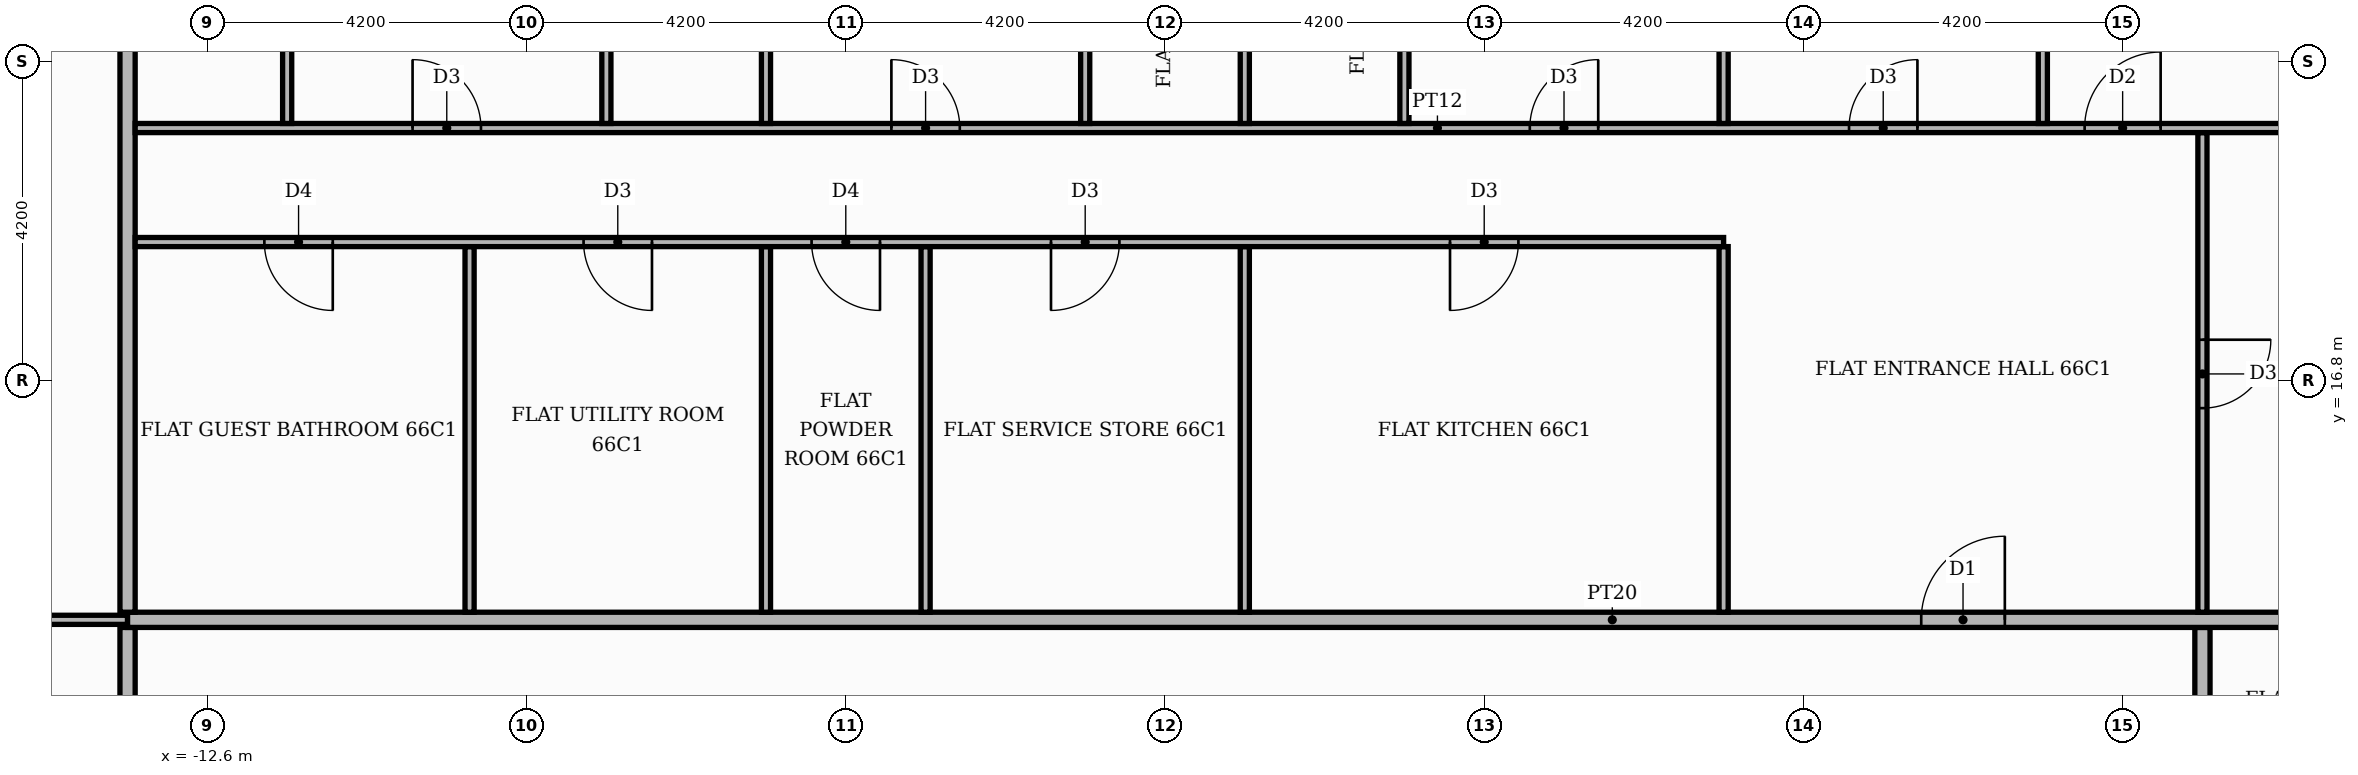
"""IFC4 building model, lengths in metres.
Left out: names, types, materials, properties, quantities, classifications, styles, units other than length and angle.
Written with IfcOpenShell. Run it as: python <this file> out.ifc"""

import sys

from ifc_helpers import new_model, si_unit, direction, frame, frame_2d, origin, place, context, subcontext, project, spatial, rectangle, extrude, element, fill, save


model = new_model("IFC4")
c1 = context("Model", 3, precision=1e-05, world=origin(), true_north=direction((0.0, 1.0)))
c2 = subcontext(c1, "Body", "Model", "MODEL_VIEW")
j1 = project(units=[si_unit("LENGTHUNIT", "METRE"), si_unit("PLANEANGLEUNIT", "RADIAN")], contexts=[c1])
p1 = place(None, origin())
s1 = spatial("IfcSite", under=j1, at=p1, CompositionType="ELEMENT")
p2 = place(p1, origin())
s2 = spatial("IfcBuilding", under=s1, at=p2, CompositionType="ELEMENT")
p3 = place(p2, frame((0.0, 0.0, 275.7)))
s3 = spatial("IfcBuildingStorey", under=s2, at=p3, CompositionType="ELEMENT", Elevation=275.7)
for number, where, z_axis, x_axis in (
    (1, (-13.65, 11.1, 0.0), (0.0, 0.0, 1.0), (0.0, 1.0, 0.0)),
    (2, (13.65, 11.1, 0.0), (0.0, 0.0, 1.0), (0.0, 1.0, 0.0)),
):
    element("IfcWall", number, at=place(p3, frame(where, z_axis=z_axis, x_axis=x_axis)), inside=s3, PredefinedType="PARTITIONING", context=c2, shape_type="SweptSolid", body=[
        extrude(rectangle(XDim=2.45, YDim=0.2, at=frame_2d((1.225, 0.0))), origin(), (0.0, 0.0, 1.0), 3.48),
    ])
p4 = place(p3, frame((-20.72, 13.65, 0.0), z_axis=(0.0, 0.0, 1.0), x_axis=(1.0, 0.0, 0.0)))
e3 = element("IfcWall", 3, at=p4, inside=s3, PredefinedType="PARTITIONING", context=c2, shape_type="SweptSolid", body=[
    extrude(rectangle(XDim=7.07, YDim=0.12, at=frame_2d((3.535, 0.0))), origin(), (0.0, 0.0, 1.0), 3.48),
])
p5 = place(p4, frame((3.085, 0.0, 0.0)))
e4 = element("IfcOpeningElement", 4, at=p5, cuts=e3, PredefinedType="OPENING", context=c2, shape_type="SweptSolid", body=[
    extrude(rectangle(XDim=0.9, YDim=2.1, at=frame_2d((0.45, 1.05))), frame((0.0, 0.07, 0.0), z_axis=(0.0, -1.0, 0.0), x_axis=(1.0, 0.0, 0.0)), (0.0, 0.0, 1.0), 0.14),
])
p6 = place(p3, frame((-13.65, 13.65, 0.0), z_axis=(0.0, 0.0, 1.0), x_axis=(1.0, 0.0, 0.0)))
e5 = element("IfcWall", 5, at=p6, inside=s3, PredefinedType="PARTITIONING", context=c2, shape_type="SweptSolid", body=[
    extrude(rectangle(XDim=39.07, YDim=0.2, at=frame_2d((19.535, 0.0))), origin(), (0.0, 0.0, 1.0), 3.48),
])
p7 = place(p6, frame((23.6, 0.0, 0.0)))
e6 = element("IfcOpeningElement", 6, at=p7, cuts=e5, PredefinedType="OPENING", context=c2, shape_type="SweptSolid", body=[
    extrude(rectangle(XDim=1.1, YDim=2.4, at=frame_2d((0.55, 1.2))), frame((0.0, 0.11, 0.0), z_axis=(0.0, -1.0, 0.0), x_axis=(1.0, 0.0, 0.0)), (0.0, 0.0, 1.0), 0.22),
])
p8 = place(p3, frame((-13.65, 13.75, 0.0), z_axis=(0.0, 0.0, 1.0), x_axis=(0.0, 1.0, 0.0)))
e7 = element("IfcWall", 7, at=p8, inside=s3, PredefinedType="PARTITIONING", context=c2, shape_type="SweptSolid", body=[
    extrude(rectangle(XDim=11.67, YDim=0.2, at=frame_2d((5.835, 0.0))), origin(), (0.0, 0.0, 1.0), 3.48),
])
for number, where, z_axis, x_axis in (
    (8, (-9.15, 13.75, 0.0), (0.0, 0.0, 1.0), (0.0, 1.0, 0.0)),
    (9, (-5.25, 13.75, 0.0), (0.0, 0.0, 1.0), (0.0, 1.0, 0.0)),
    (10, (-3.15, 13.75, 0.0), (0.0, 0.0, 1.0), (0.0, 1.0, 0.0)),
    (11, (1.05, 13.75, 0.0), (0.0, 0.0, 1.0), (0.0, 1.0, 0.0)),
    (12, (7.35, 13.75, 0.0), (0.0, 0.0, 1.0), (0.0, 1.0, 0.0)),
):
    element("IfcWall", number, at=place(p3, frame(where, z_axis=z_axis, x_axis=x_axis)), inside=s3, PredefinedType="PARTITIONING", context=c2, shape_type="SweptSolid", body=[
        extrude(rectangle(XDim=4.81, YDim=0.12, at=frame_2d((2.405, 0.0))), origin(), (0.0, 0.0, 1.0), 3.48),
    ])
p9 = place(p3, frame((13.65, 13.75, 0.0), z_axis=(0.0, 0.0, 1.0), x_axis=(0.0, 1.0, 0.0)))
e13 = element("IfcWall", 13, at=p9, inside=s3, PredefinedType="PARTITIONING", context=c2, shape_type="SweptSolid", body=[
    extrude(rectangle(XDim=6.31, YDim=0.12, at=frame_2d((3.155, 0.0))), origin(), (0.0, 0.0, 1.0), 3.48),
])
p10 = place(p9, frame((2.685, 0.0, 0.0)))
e14 = element("IfcOpeningElement", 14, at=p10, cuts=e13, PredefinedType="OPENING", context=c2, shape_type="SweptSolid", body=[
    extrude(rectangle(XDim=0.9, YDim=2.1, at=frame_2d((0.45, 1.05))), frame((0.0, 0.07, 0.0), z_axis=(0.0, -1.0, 0.0), x_axis=(1.0, 0.0, 0.0)), (0.0, 0.0, 1.0), 0.14),
])
p11 = place(p3, frame((-13.55, 18.62, 0.0), z_axis=(0.0, 0.0, 1.0), x_axis=(1.0, 0.0, 0.0)))
e15 = element("IfcWall", 15, at=p11, inside=s3, PredefinedType="PARTITIONING", context=c2, shape_type="SweptSolid", body=[
    extrude(rectangle(XDim=20.9, YDim=0.12, at=frame_2d((10.45, 0.0))), origin(), (0.0, 0.0, 1.0), 3.48),
])
p12 = place(p11, frame((17.3, 0.0, 0.0)))
e16 = element("IfcOpeningElement", 16, at=p12, cuts=e15, PredefinedType="OPENING", context=c2, shape_type="SweptSolid", body=[
    extrude(rectangle(XDim=0.9, YDim=2.1, at=frame_2d((0.45, 1.05))), frame((0.0, 0.07, 0.0), z_axis=(0.0, -1.0, 0.0), x_axis=(1.0, 0.0, 0.0)), (0.0, 0.0, 1.0), 0.14),
])
p13 = place(p11, frame((12.05, 0.0, 0.0)))
e17 = element("IfcOpeningElement", 17, at=p13, cuts=e15, PredefinedType="OPENING", context=c2, shape_type="SweptSolid", body=[
    extrude(rectangle(XDim=0.9, YDim=2.1, at=frame_2d((0.45, 1.05))), frame((0.0, 0.07, 0.0), z_axis=(0.0, -1.0, 0.0), x_axis=(1.0, 0.0, 0.0)), (0.0, 0.0, 1.0), 0.14),
])
p14 = place(p11, frame((8.9, 0.0, 0.0)))
e18 = element("IfcOpeningElement", 18, at=p14, cuts=e15, PredefinedType="OPENING", context=c2, shape_type="SweptSolid", body=[
    extrude(rectangle(XDim=0.9, YDim=2.1, at=frame_2d((0.45, 1.05))), frame((0.0, 0.07, 0.0), z_axis=(0.0, -1.0, 0.0), x_axis=(1.0, 0.0, 0.0)), (0.0, 0.0, 1.0), 0.14),
])
p15 = place(p11, frame((5.9, 0.0, 0.0)))
e19 = element("IfcOpeningElement", 19, at=p15, cuts=e15, PredefinedType="OPENING", context=c2, shape_type="SweptSolid", body=[
    extrude(rectangle(XDim=0.9, YDim=2.1, at=frame_2d((0.45, 1.05))), frame((0.0, 0.07, 0.0), z_axis=(0.0, -1.0, 0.0), x_axis=(1.0, 0.0, 0.0)), (0.0, 0.0, 1.0), 0.14),
])
p16 = place(p11, frame((1.7, 0.0, 0.0)))
e20 = element("IfcOpeningElement", 20, at=p16, cuts=e15, PredefinedType="OPENING", context=c2, shape_type="SweptSolid", body=[
    extrude(rectangle(XDim=0.9, YDim=2.1, at=frame_2d((0.45, 1.05))), frame((0.0, 0.07, 0.0), z_axis=(0.0, -1.0, 0.0), x_axis=(1.0, 0.0, 0.0)), (0.0, 0.0, 1.0), 0.14),
])
p17 = place(p3, frame((-13.55, 20.12, 0.0), z_axis=(0.0, 0.0, 1.0), x_axis=(1.0, 0.0, 0.0)))
e21 = element("IfcWall", 21, at=p17, inside=s3, PredefinedType="PARTITIONING", context=c2, shape_type="SweptSolid", body=[
    extrude(rectangle(XDim=34.269, YDim=0.12, at=frame_2d((17.135, 0.0))), origin(), (0.0, 0.0, 1.0), 3.48),
])
p18 = place(p17, frame((25.65, 0.0, 0.0)))
e22 = element("IfcOpeningElement", 22, at=p18, cuts=e21, PredefinedType="OPENING", context=c2, shape_type="SweptSolid", body=[
    extrude(rectangle(XDim=1.0, YDim=2.1, at=frame_2d((0.5, 1.05))), frame((0.0, 0.07, 0.0), z_axis=(0.0, -1.0, 0.0), x_axis=(1.0, 0.0, 0.0)), (0.0, 0.0, 1.0), 0.14),
])
p19 = place(p17, frame((22.55, 0.0, 0.0)))
e23 = element("IfcOpeningElement", 23, at=p19, cuts=e21, PredefinedType="OPENING", context=c2, shape_type="SweptSolid", body=[
    extrude(rectangle(XDim=0.9, YDim=2.1, at=frame_2d((0.45, 1.05))), frame((0.0, 0.07, 0.0), z_axis=(0.0, -1.0, 0.0), x_axis=(1.0, 0.0, 0.0)), (0.0, 0.0, 1.0), 0.14),
])
p20 = place(p17, frame((18.35, 0.0, 0.0)))
e24 = element("IfcOpeningElement", 24, at=p20, cuts=e21, PredefinedType="OPENING", context=c2, shape_type="SweptSolid", body=[
    extrude(rectangle(XDim=0.9, YDim=2.1, at=frame_2d((0.45, 1.05))), frame((0.0, 0.07, 0.0), z_axis=(0.0, -1.0, 0.0), x_axis=(1.0, 0.0, 0.0)), (0.0, 0.0, 1.0), 0.14),
])
p21 = place(p17, frame((9.95, 0.0, 0.0)))
e25 = element("IfcOpeningElement", 25, at=p21, cuts=e21, PredefinedType="OPENING", context=c2, shape_type="SweptSolid", body=[
    extrude(rectangle(XDim=0.9, YDim=2.1, at=frame_2d((0.45, 1.05))), frame((0.0, 0.07, 0.0), z_axis=(0.0, -1.0, 0.0), x_axis=(1.0, 0.0, 0.0)), (0.0, 0.0, 1.0), 0.14),
])
p22 = place(p17, frame((3.65, 0.0, 0.0)))
e26 = element("IfcOpeningElement", 26, at=p22, cuts=e21, PredefinedType="OPENING", context=c2, shape_type="SweptSolid", body=[
    extrude(rectangle(XDim=0.9, YDim=2.1, at=frame_2d((0.45, 1.05))), frame((0.0, 0.07, 0.0), z_axis=(0.0, -1.0, 0.0), x_axis=(1.0, 0.0, 0.0)), (0.0, 0.0, 1.0), 0.14),
])
p23 = place(p3, frame((-11.55, 20.18, 0.0), z_axis=(0.0, 0.0, 1.0), x_axis=(0.0, 1.0, 0.0)))
e27 = element("IfcWall", 27, at=p23, inside=s3, PredefinedType="PARTITIONING", context=c2, shape_type="SweptSolid", body=[
    extrude(rectangle(XDim=5.24, YDim=0.12, at=frame_2d((2.62, 0.0))), origin(), (0.0, 0.0, 1.0), 3.48),
])
p24 = place(p23, frame((2.29, 0.0, 0.0)))
e28 = element("IfcOpeningElement", 28, at=p24, cuts=e27, PredefinedType="OPENING", context=c2, shape_type="SweptSolid", body=[
    extrude(rectangle(XDim=0.9, YDim=2.1, at=frame_2d((0.45, 1.05))), frame((0.0, 0.07, 0.0), z_axis=(0.0, -1.0, 0.0), x_axis=(1.0, 0.0, 0.0)), (0.0, 0.0, 1.0), 0.14),
])
p25 = place(p3, frame((-7.35, 20.18, 0.0), z_axis=(0.0, 0.0, 1.0), x_axis=(0.0, 1.0, 0.0)))
e29 = element("IfcWall", 29, at=p25, inside=s3, PredefinedType="PARTITIONING", context=c2, shape_type="SweptSolid", body=[
    extrude(rectangle(XDim=5.24, YDim=0.12, at=frame_2d((2.62, 0.0))), origin(), (0.0, 0.0, 1.0), 3.48),
])
p26 = place(p3, frame((-5.25, 20.18, 0.0), z_axis=(0.0, 0.0, 1.0), x_axis=(0.0, 1.0, 0.0)))
e30 = element("IfcWall", 30, at=p26, inside=s3, PredefinedType="PARTITIONING", context=c2, shape_type="SweptSolid", body=[
    extrude(rectangle(XDim=5.24, YDim=0.12, at=frame_2d((2.62, 0.0))), origin(), (0.0, 0.0, 1.0), 3.48),
])
p27 = place(p26, frame((2.29, 0.0, 0.0)))
e31 = element("IfcOpeningElement", 31, at=p27, cuts=e30, PredefinedType="OPENING", context=c2, shape_type="SweptSolid", body=[
    extrude(rectangle(XDim=0.9, YDim=2.1, at=frame_2d((0.45, 1.05))), frame((0.0, 0.07, 0.0), z_axis=(0.0, -1.0, 0.0), x_axis=(1.0, 0.0, 0.0)), (0.0, 0.0, 1.0), 0.14),
])
p28 = place(p3, frame((-1.05, 20.18, 0.0), z_axis=(0.0, 0.0, 1.0), x_axis=(0.0, 1.0, 0.0)))
e32 = element("IfcWall", 32, at=p28, inside=s3, PredefinedType="PARTITIONING", context=c2, shape_type="SweptSolid", body=[
    extrude(rectangle(XDim=5.24, YDim=0.12, at=frame_2d((2.62, 0.0))), origin(), (0.0, 0.0, 1.0), 3.48),
])
p29 = place(p3, frame((1.05, 20.18, 0.0), z_axis=(0.0, 0.0, 1.0), x_axis=(0.0, 1.0, 0.0)))
e33 = element("IfcWall", 33, at=p29, inside=s3, PredefinedType="PARTITIONING", context=c2, shape_type="SweptSolid", body=[
    extrude(rectangle(XDim=5.24, YDim=0.12, at=frame_2d((2.62, 0.0))), origin(), (0.0, 0.0, 1.0), 3.48),
])
p30 = place(p29, frame((2.29, 0.0, 0.0)))
e34 = element("IfcOpeningElement", 34, at=p30, cuts=e33, PredefinedType="OPENING", context=c2, shape_type="SweptSolid", body=[
    extrude(rectangle(XDim=0.9, YDim=2.1, at=frame_2d((0.45, 1.05))), frame((0.0, 0.07, 0.0), z_axis=(0.0, -1.0, 0.0), x_axis=(1.0, 0.0, 0.0)), (0.0, 0.0, 1.0), 0.14),
])
p31 = place(p3, frame((3.15, 20.18, 0.0), z_axis=(0.0, 0.0, 1.0), x_axis=(0.0, 1.0, 0.0)))
e35 = element("IfcWall", 35, at=p31, inside=s3, PredefinedType="PARTITIONING", context=c2, shape_type="SweptSolid", body=[
    extrude(rectangle(XDim=5.24, YDim=0.12, at=frame_2d((2.62, 0.0))), origin(), (0.0, 0.0, 1.0), 3.48),
])
p32 = place(p31, frame((2.29, 0.0, 0.0)))
e36 = element("IfcOpeningElement", 36, at=p32, cuts=e35, PredefinedType="OPENING", context=c2, shape_type="SweptSolid", body=[
    extrude(rectangle(XDim=0.9, YDim=2.1, at=frame_2d((0.45, 1.05))), frame((0.0, 0.07, 0.0), z_axis=(0.0, -1.0, 0.0), x_axis=(1.0, 0.0, 0.0)), (0.0, 0.0, 1.0), 0.14),
])
for number, where, z_axis, x_axis in (
    (37, (7.35, 20.18, 0.0), (0.0, 0.0, 1.0), (0.0, 1.0, 0.0)),
    (38, (11.55, 20.18, 0.0), (0.0, 0.0, 1.0), (0.0, 1.0, 0.0)),
):
    element("IfcWall", number, at=place(p3, frame(where, z_axis=z_axis, x_axis=x_axis)), inside=s3, PredefinedType="PARTITIONING", context=c2, shape_type="SweptSolid", body=[
        extrude(rectangle(XDim=5.24, YDim=0.12, at=frame_2d((2.62, 0.0))), origin(), (0.0, 0.0, 1.0), 3.48),
    ])
p33 = place(p7, origin())
e39 = element("IfcDoor", 39, at=p33, inside=s3, OperationType="SINGLE_SWING_RIGHT", PredefinedType="DOOR", context=c2, shape_type="SweptSolid", body=[
    extrude(rectangle(XDim=1.1, YDim=2.4, at=frame_2d((0.55, 1.2))), frame((0.0, 0.025, 0.0), z_axis=(0.0, -1.0, 0.0), x_axis=(1.0, 0.0, 0.0)), (0.0, 0.0, 1.0), 0.05),
])
fill(e6, e39)
p34 = place(p10, frame((0.9, 0.0, 0.0), z_axis=(0.0, 0.0, 1.0), x_axis=(-1.0, 0.0, 0.0)))
e40 = element("IfcDoor", 40, at=p34, inside=s3, OperationType="SINGLE_SWING_RIGHT", PredefinedType="DOOR", context=c2, shape_type="SweptSolid", body=[
    extrude(rectangle(XDim=0.9, YDim=2.1, at=frame_2d((0.45, 1.05))), frame((0.0, 0.025, 0.0), z_axis=(0.0, -1.0, 0.0), x_axis=(1.0, 0.0, 0.0)), (0.0, 0.0, 1.0), 0.05),
])
fill(e14, e40)
p35 = place(p12, frame((0.9, 0.0, 0.0), z_axis=(0.0, 0.0, 1.0), x_axis=(-1.0, 0.0, 0.0)))
e41 = element("IfcDoor", 41, at=p35, inside=s3, OperationType="SINGLE_SWING_LEFT", PredefinedType="DOOR", context=c2, shape_type="SweptSolid", body=[
    extrude(rectangle(XDim=0.9, YDim=2.1, at=frame_2d((0.45, 1.05))), frame((0.0, 0.025, 0.0), z_axis=(0.0, -1.0, 0.0), x_axis=(1.0, 0.0, 0.0)), (0.0, 0.0, 1.0), 0.05),
])
fill(e16, e41)
p36 = place(p13, frame((0.9, 0.0, 0.0), z_axis=(0.0, 0.0, 1.0), x_axis=(-1.0, 0.0, 0.0)))
e42 = element("IfcDoor", 42, at=p36, inside=s3, OperationType="SINGLE_SWING_LEFT", PredefinedType="DOOR", context=c2, shape_type="SweptSolid", body=[
    extrude(rectangle(XDim=0.9, YDim=2.1, at=frame_2d((0.45, 1.05))), frame((0.0, 0.025, 0.0), z_axis=(0.0, -1.0, 0.0), x_axis=(1.0, 0.0, 0.0)), (0.0, 0.0, 1.0), 0.05),
])
fill(e17, e42)
p37 = place(p14, frame((0.9, 0.0, 0.0), z_axis=(0.0, 0.0, 1.0), x_axis=(-1.0, 0.0, 0.0)))
e43 = element("IfcDoor", 43, at=p37, inside=s3, OperationType="SINGLE_SWING_RIGHT", PredefinedType="DOOR", context=c2, shape_type="SweptSolid", body=[
    extrude(rectangle(XDim=0.9, YDim=2.1, at=frame_2d((0.45, 1.05))), frame((0.0, 0.025, 0.0), z_axis=(0.0, -1.0, 0.0), x_axis=(1.0, 0.0, 0.0)), (0.0, 0.0, 1.0), 0.05),
])
fill(e18, e43)
p38 = place(p15, frame((0.9, 0.0, 0.0), z_axis=(0.0, 0.0, 1.0), x_axis=(-1.0, 0.0, 0.0)))
e44 = element("IfcDoor", 44, at=p38, inside=s3, OperationType="SINGLE_SWING_RIGHT", PredefinedType="DOOR", context=c2, shape_type="SweptSolid", body=[
    extrude(rectangle(XDim=0.9, YDim=2.1, at=frame_2d((0.45, 1.05))), frame((0.0, 0.025, 0.0), z_axis=(0.0, -1.0, 0.0), x_axis=(1.0, 0.0, 0.0)), (0.0, 0.0, 1.0), 0.05),
])
fill(e19, e44)
p39 = place(p16, frame((0.9, 0.0, 0.0), z_axis=(0.0, 0.0, 1.0), x_axis=(-1.0, 0.0, 0.0)))
e45 = element("IfcDoor", 45, at=p39, inside=s3, OperationType="SINGLE_SWING_RIGHT", PredefinedType="DOOR", context=c2, shape_type="SweptSolid", body=[
    extrude(rectangle(XDim=0.9, YDim=2.1, at=frame_2d((0.45, 1.05))), frame((0.0, 0.025, 0.0), z_axis=(0.0, -1.0, 0.0), x_axis=(1.0, 0.0, 0.0)), (0.0, 0.0, 1.0), 0.05),
])
fill(e20, e45)
p40 = place(p18, origin())
e46 = element("IfcDoor", 46, at=p40, inside=s3, OperationType="SINGLE_SWING_RIGHT", PredefinedType="DOOR", context=c2, shape_type="SweptSolid", body=[
    extrude(rectangle(XDim=1.0, YDim=2.1, at=frame_2d((0.5, 1.05))), frame((0.0, 0.025, 0.0), z_axis=(0.0, -1.0, 0.0), x_axis=(1.0, 0.0, 0.0)), (0.0, 0.0, 1.0), 0.05),
])
fill(e22, e46)
p41 = place(p19, origin())
e47 = element("IfcDoor", 47, at=p41, inside=s3, OperationType="SINGLE_SWING_RIGHT", PredefinedType="DOOR", context=c2, shape_type="SweptSolid", body=[
    extrude(rectangle(XDim=0.9, YDim=2.1, at=frame_2d((0.45, 1.05))), frame((0.0, 0.025, 0.0), z_axis=(0.0, -1.0, 0.0), x_axis=(1.0, 0.0, 0.0)), (0.0, 0.0, 1.0), 0.05),
])
fill(e23, e47)
p42 = place(p20, origin())
e48 = element("IfcDoor", 48, at=p42, inside=s3, OperationType="SINGLE_SWING_RIGHT", PredefinedType="DOOR", context=c2, shape_type="SweptSolid", body=[
    extrude(rectangle(XDim=0.9, YDim=2.1, at=frame_2d((0.45, 1.05))), frame((0.0, 0.025, 0.0), z_axis=(0.0, -1.0, 0.0), x_axis=(1.0, 0.0, 0.0)), (0.0, 0.0, 1.0), 0.05),
])
fill(e24, e48)
p43 = place(p21, origin())
e49 = element("IfcDoor", 49, at=p43, inside=s3, OperationType="SINGLE_SWING_LEFT", PredefinedType="DOOR", context=c2, shape_type="SweptSolid", body=[
    extrude(rectangle(XDim=0.9, YDim=2.1, at=frame_2d((0.45, 1.05))), frame((0.0, 0.025, 0.0), z_axis=(0.0, -1.0, 0.0), x_axis=(1.0, 0.0, 0.0)), (0.0, 0.0, 1.0), 0.05),
])
fill(e25, e49)
p44 = place(p22, origin())
e50 = element("IfcDoor", 50, at=p44, inside=s3, OperationType="SINGLE_SWING_LEFT", PredefinedType="DOOR", context=c2, shape_type="SweptSolid", body=[
    extrude(rectangle(XDim=0.9, YDim=2.1, at=frame_2d((0.45, 1.05))), frame((0.0, 0.025, 0.0), z_axis=(0.0, -1.0, 0.0), x_axis=(1.0, 0.0, 0.0)), (0.0, 0.0, 1.0), 0.05),
])
fill(e26, e50)
save(model, sys.argv[1])
